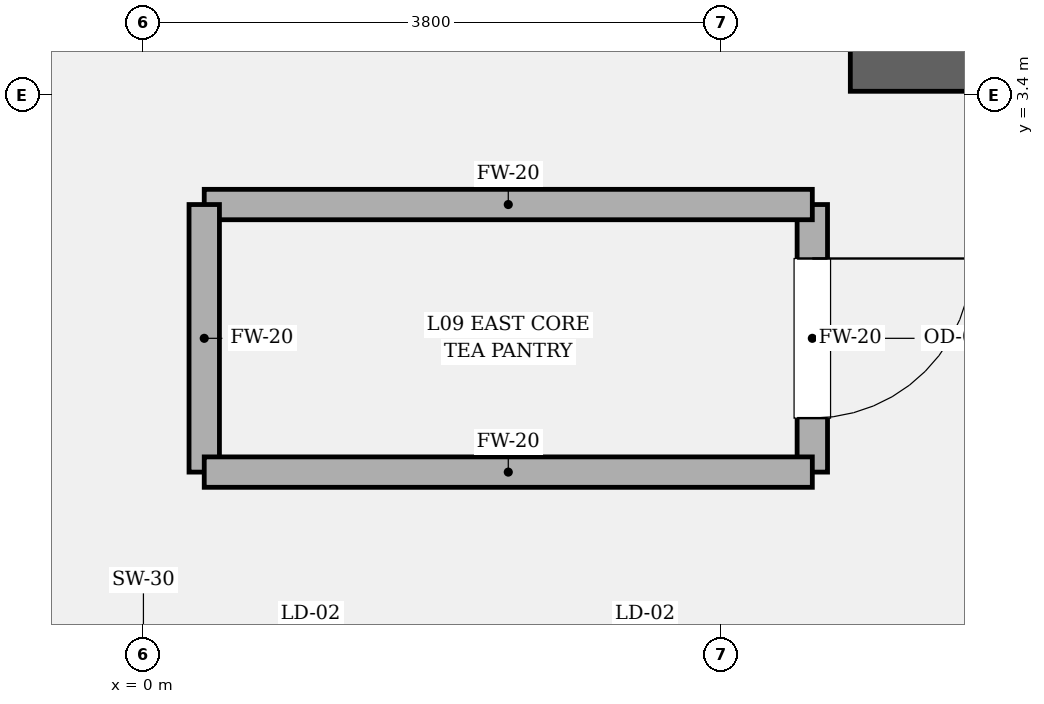
"""IFC4 building model, lengths in metres.
Left out: names, types, materials, properties, quantities, classifications, styles, units other than length and angle.
Written with IfcOpenShell. Run it as: python <this file> out.ifc"""

import sys

from ifc_helpers import new_model, si_unit, direction, frame, frame_2d, origin, place, context, subcontext, project, spatial, rectangle, extrude, element, fill, save


model = new_model("IFC4")
c1 = context("Model", 3, precision=1e-05, world=origin(), true_north=direction((0.0, 1.0)))
c2 = subcontext(c1, "Body", "Model", "MODEL_VIEW")
j1 = project(units=[si_unit("LENGTHUNIT", "METRE"), si_unit("PLANEANGLEUNIT", "RADIAN")], contexts=[c1])
p1 = place(None, origin())
s1 = spatial("IfcSite", under=j1, at=p1, CompositionType="ELEMENT")
p2 = place(p1, origin())
s2 = spatial("IfcBuilding", under=s1, at=p2, CompositionType="ELEMENT")
p3 = place(p2, frame((0.0, 0.0, 44.4)))
s3 = spatial("IfcBuildingStorey", under=s2, at=p3, CompositionType="ELEMENT", Elevation=44.4)
p4 = place(p3, frame((4.65, 3.6, 0.0), z_axis=(0.0, 0.0, 1.0), x_axis=(1.0, 0.0, 0.0)))
e1 = element("IfcWall", 1, at=p4, inside=s3, PredefinedType="SOLIDWALL", context=c2, shape_type="SweptSolid", body=[
    extrude(rectangle(XDim=5.175, YDim=0.35, at=frame_2d((2.587, 0.0))), origin(), (0.0, 0.0, 1.0), 4.05),
])
p5 = place(p3, frame((4.4, 0.92, 0.0), z_axis=(0.0, 0.0, 1.0), x_axis=(0.0, 1.0, 0.0)))
e2 = element("IfcWall", 2, at=p5, inside=s3, PredefinedType="SOLIDWALL", context=c2, shape_type="SweptSolid", body=[
    extrude(rectangle(XDim=1.76, YDim=0.2, at=frame_2d((0.88, 0.0))), origin(), (0.0, 0.0, 1.0), 3.81),
])
p6 = place(p5, frame((0.355, 0.0, 0.0)))
e3 = element("IfcOpeningElement", 3, at=p6, cuts=e2, PredefinedType="OPENING", context=c2, shape_type="SweptSolid", body=[
    extrude(rectangle(XDim=1.05, YDim=2.2, at=frame_2d((0.525, 1.1))), frame((0.0, 0.11, 0.0), z_axis=(0.0, -1.0, 0.0), x_axis=(1.0, 0.0, 0.0)), (0.0, 0.0, 1.0), 0.22),
])
p7 = place(p3, frame((4.4, 2.68, 0.0), z_axis=(0.0, 0.0, 1.0), x_axis=(-1.0, 0.0, 0.0)))
e4 = element("IfcWall", 4, at=p7, inside=s3, PredefinedType="SOLIDWALL", context=c2, shape_type="SweptSolid", body=[
    extrude(rectangle(XDim=4.0, YDim=0.2, at=frame_2d((2.0, 0.0))), origin(), (0.0, 0.0, 1.0), 3.81),
])
p8 = place(p3, frame((0.4, 2.68, 0.0), z_axis=(0.0, 0.0, 1.0), x_axis=(0.0, -1.0, 0.0)))
e5 = element("IfcWall", 5, at=p8, inside=s3, PredefinedType="SOLIDWALL", context=c2, shape_type="SweptSolid", body=[
    extrude(rectangle(XDim=1.76, YDim=0.2, at=frame_2d((0.88, 0.0))), origin(), (0.0, 0.0, 1.0), 3.81),
])
p9 = place(p3, frame((0.4, 0.92, 0.0), z_axis=(0.0, 0.0, 1.0), x_axis=(1.0, 0.0, 0.0)))
e6 = element("IfcWall", 6, at=p9, inside=s3, PredefinedType="SOLIDWALL", context=c2, shape_type="SweptSolid", body=[
    extrude(rectangle(XDim=4.0, YDim=0.2, at=frame_2d((2.0, 0.0))), origin(), (0.0, 0.0, 1.0), 3.81),
])
p10 = place(p6, origin())
e7 = element("IfcDoor", 7, at=p10, inside=s3, OperationType="SINGLE_SWING_RIGHT", PredefinedType="DOOR", context=c2, shape_type="SweptSolid", body=[
    extrude(rectangle(XDim=1.05, YDim=2.2, at=frame_2d((0.525, 1.1))), frame((0.0, 0.025, 0.0), z_axis=(0.0, -1.0, 0.0), x_axis=(1.0, 0.0, 0.0)), (0.0, 0.0, 1.0), 0.05),
])
fill(e3, e7)
save(model, sys.argv[1])
